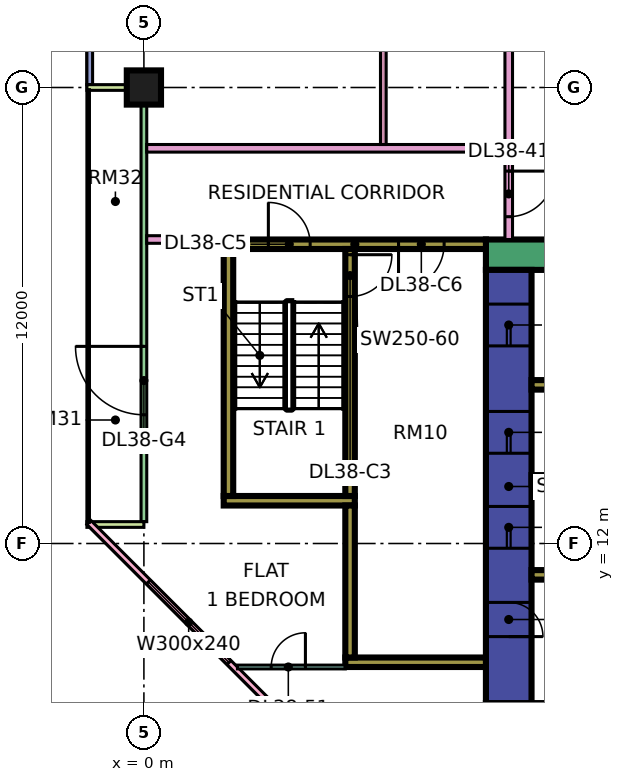
"""IFC4 building model, lengths in metres.
Left out: names, types, materials, properties, quantities, classifications, styles, units other than length and angle.
Written with IfcOpenShell. Run it as: python <this file> out.ifc"""

import sys

from ifc_helpers import new_model, si_unit, direction, frame, frame_2d, origin, origin_2d, place, context, subcontext, project, spatial, rectangle, extrude, element, fill, save


model = new_model("IFC4")
c1 = context("Model", 3, precision=1e-05, world=origin(), true_north=direction((0.0, 1.0)))
c2 = subcontext(c1, "Body", "Model", "MODEL_VIEW")
j1 = project(units=[si_unit("LENGTHUNIT", "METRE"), si_unit("PLANEANGLEUNIT", "RADIAN")], contexts=[c1])
p1 = place(None, origin())
s1 = spatial("IfcSite", under=j1, at=p1, CompositionType="ELEMENT")
p2 = place(p1, origin())
s2 = spatial("IfcBuilding", under=s1, at=p2, CompositionType="ELEMENT")
p3 = place(p2, frame((0.0, 0.0, 168.65)))
s3 = spatial("IfcBuildingStorey", under=s2, at=p3, CompositionType="ELEMENT", Elevation=168.65)
p4 = place(p3, frame((0.0, 24.0, 0.0), z_axis=(0.0, 0.0, 1.0), x_axis=(1.0, 0.0, 0.0)))
e1 = element("IfcColumn", 1, at=p4, inside=s3, PredefinedType="COLUMN", context=c2, shape_type="SweptSolid", body=[
    extrude(rectangle(XDim=0.9, YDim=0.9, at=origin_2d()), origin(), (0.0, 0.0, 1.0), 3.75),
])
p5 = place(p3, frame((9.0, 19.6, 0.0), z_axis=(0.0, 0.0, 1.0), x_axis=(1.0, 0.0, 0.0)))
e2 = element("IfcWall", 2, at=p5, inside=s3, PredefinedType="SHEAR", context=c2, shape_type="SweptSolid", body=[
    extrude(rectangle(XDim=25.0, YDim=0.8, at=frame_2d((12.5, 0.0))), origin(), (0.0, 0.0, 1.0), 3.75),
])
p6 = place(p5, frame((19.1, 0.0, 0.0)))
e3 = element("IfcOpeningElement", 3, at=p6, cuts=e2, PredefinedType="OPENING", context=c2, shape_type="SweptSolid", body=[
    extrude(rectangle(XDim=1.8, YDim=2.4, at=frame_2d((0.9, 1.2))), frame((0.0, 0.41, 0.0), z_axis=(0.0, -1.0, 0.0), x_axis=(1.0, 0.0, 0.0)), (0.0, 0.0, 1.0), 0.82),
])
p7 = place(p3, frame((9.6, 7.8, 0.0), z_axis=(0.0, 0.0, 1.0), x_axis=(0.0, 1.0, 0.0)))
e4 = element("IfcWall", 4, at=p7, inside=s3, PredefinedType="SHEAR", context=c2, shape_type="SweptSolid", body=[
    extrude(rectangle(XDim=11.4, YDim=1.2, at=frame_2d((5.7, 0.0))), origin(), (0.0, 0.0, 1.0), 3.75),
])
p8 = place(p7, frame((4.075, 0.0, 0.0)))
e5 = element("IfcOpeningElement", 5, at=p8, cuts=e4, PredefinedType="OPENING", context=c2, shape_type="SweptSolid", body=[
    extrude(rectangle(XDim=1.1, YDim=2.2, at=frame_2d((0.55, 1.1))), frame((0.0, 0.61, 0.0), z_axis=(0.0, -1.0, 0.0), x_axis=(1.0, 0.0, 0.0)), (0.0, 0.0, 1.0), 1.22),
])
p9 = place(p7, frame((6.575, 0.0, 0.0)))
e6 = element("IfcOpeningElement", 6, at=p9, cuts=e4, PredefinedType="OPENING", context=c2, shape_type="SweptSolid", body=[
    extrude(rectangle(XDim=1.1, YDim=2.2, at=frame_2d((0.55, 1.1))), frame((0.0, 0.61, 0.0), z_axis=(0.0, -1.0, 0.0), x_axis=(1.0, 0.0, 0.0)), (0.0, 0.0, 1.0), 1.22),
])
p10 = place(p7, frame((9.4, 0.0, 0.0)))
e7 = element("IfcOpeningElement", 7, at=p10, cuts=e4, PredefinedType="OPENING", context=c2, shape_type="SweptSolid", body=[
    extrude(rectangle(XDim=1.1, YDim=2.2, at=frame_2d((0.55, 1.1))), frame((0.0, 0.61, 0.0), z_axis=(0.0, -1.0, 0.0), x_axis=(1.0, 0.0, 0.0)), (0.0, 0.0, 1.0), 1.22),
])
p11 = place(p7, frame((1.75, 0.0, 0.0)))
e8 = element("IfcOpeningElement", 8, at=p11, cuts=e4, PredefinedType="OPENING", context=c2, shape_type="SweptSolid", body=[
    extrude(rectangle(XDim=0.9, YDim=2.1, at=frame_2d((0.45, 1.05))), frame((0.0, 0.61, 0.0), z_axis=(0.0, -1.0, 0.0), x_axis=(1.0, 0.0, 0.0)), (0.0, 0.0, 1.0), 1.22),
])
for number, where, z_axis, x_axis in (
    (9, (10.2, 11.175, 0.0), (0.0, 0.0, 1.0), (1.0, 0.0, 0.0)),
    (10, (10.2, 13.675, 0.0), (0.0, 0.0, 1.0), (1.0, 0.0, 0.0)),
    (11, (10.2, 16.175, 0.0), (0.0, 0.0, 1.0), (1.0, 0.0, 0.0)),
):
    element("IfcWall", number, at=place(p3, frame(where, z_axis=z_axis, x_axis=x_axis)), inside=s3, PredefinedType="SHEAR", context=c2, shape_type="SweptSolid", body=[
        extrude(rectangle(XDim=3.0, YDim=0.25, at=frame_2d((1.5, 0.0))), origin(), (0.0, 0.0, 1.0), 3.75),
    ])
p12 = place(p3, frame((2.1, 19.875, 0.0), z_axis=(0.0, 0.0, 1.0), x_axis=(1.0, 0.0, 0.0)))
e12 = element("IfcWall", 12, at=p12, inside=s3, PredefinedType="SHEAR", context=c2, shape_type="SweptSolid", body=[
    extrude(rectangle(XDim=6.9, YDim=0.25, at=frame_2d((3.45, 0.0))), origin(), (0.0, 0.0, 1.0), 3.75),
])
p13 = place(p12, frame((1.175, 0.0, 0.0)))
e13 = element("IfcOpeningElement", 13, at=p13, cuts=e12, PredefinedType="OPENING", context=c2, shape_type="SweptSolid", body=[
    extrude(rectangle(XDim=1.1, YDim=2.2, at=frame_2d((0.55, 1.1))), frame((0.0, 0.135, 0.0), z_axis=(0.0, -1.0, 0.0), x_axis=(1.0, 0.0, 0.0)), (0.0, 0.0, 1.0), 0.27),
])
p14 = place(p12, frame((4.6, 0.0, 0.0)))
e14 = element("IfcOpeningElement", 14, at=p14, cuts=e12, PredefinedType="OPENING", context=c2, shape_type="SweptSolid", body=[
    extrude(rectangle(XDim=1.2, YDim=2.2, at=frame_2d((0.6, 1.1))), frame((0.0, 0.135, 0.0), z_axis=(0.0, -1.0, 0.0), x_axis=(1.0, 0.0, 0.0)), (0.0, 0.0, 1.0), 0.27),
])
p15 = place(p3, frame((2.1, 13.125, 0.0), z_axis=(0.0, 0.0, 1.0), x_axis=(1.0, 0.0, 0.0)))
e15 = element("IfcWall", 15, at=p15, inside=s3, PredefinedType="SHEAR", context=c2, shape_type="SweptSolid", body=[
    extrude(rectangle(XDim=3.45, YDim=0.25, at=frame_2d((1.725, 0.0))), origin(), (0.0, 0.0, 1.0), 3.75),
])
p16 = place(p3, frame((2.225, 13.25, 0.0), z_axis=(0.0, 0.0, 1.0), x_axis=(0.0, 1.0, 0.0)))
e16 = element("IfcWall", 16, at=p16, inside=s3, PredefinedType="SHEAR", context=c2, shape_type="SweptSolid", body=[
    extrude(rectangle(XDim=6.5, YDim=0.25, at=frame_2d((3.25, 0.0))), origin(), (0.0, 0.0, 1.0), 3.75),
])
p17 = place(p3, frame((5.425, 13.25, 0.0), z_axis=(0.0, 0.0, 1.0), x_axis=(0.0, 1.0, 0.0)))
e17 = element("IfcWall", 17, at=p17, inside=s3, PredefinedType="SHEAR", context=c2, shape_type="SweptSolid", body=[
    extrude(rectangle(XDim=6.5, YDim=0.25, at=frame_2d((3.25, 0.0))), origin(), (0.0, 0.0, 1.0), 3.75),
])
p18 = place(p17, frame((5.25, 0.0, 0.0)))
e18 = element("IfcOpeningElement", 18, at=p18, cuts=e17, PredefinedType="OPENING", context=c2, shape_type="SweptSolid", body=[
    extrude(rectangle(XDim=1.1, YDim=2.2, at=frame_2d((0.55, 1.1))), frame((0.0, 0.135, 0.0), z_axis=(0.0, -1.0, 0.0), x_axis=(1.0, 0.0, 0.0)), (0.0, 0.0, 1.0), 0.27),
])
p19 = place(p3, frame((5.3, 8.875, 0.0), z_axis=(0.0, 0.0, 1.0), x_axis=(1.0, 0.0, 0.0)))
e19 = element("IfcWall", 19, at=p19, inside=s3, PredefinedType="SHEAR", context=c2, shape_type="SweptSolid", body=[
    extrude(rectangle(XDim=3.7, YDim=0.25, at=frame_2d((1.85, 0.0))), origin(), (0.0, 0.0, 1.0), 3.75),
])
p20 = place(p3, frame((5.425, 9.0, 0.0), z_axis=(0.0, 0.0, 1.0), x_axis=(0.0, 1.0, 0.0)))
e20 = element("IfcWall", 20, at=p20, inside=s3, PredefinedType="SHEAR", context=c2, shape_type="SweptSolid", body=[
    extrude(rectangle(XDim=4.0, YDim=0.25, at=frame_2d((2.0, 0.0))), origin(), (0.0, 0.0, 1.0), 3.75),
])
p21 = place(p3, frame((-1.425, 35.925, 0.0), z_axis=(0.0, 0.0, 1.0), x_axis=(0.0, -1.0, 0.0)))
e21 = element("IfcWall", 21, at=p21, inside=s3, PredefinedType="SOLIDWALL", context=c2, shape_type="SweptSolid", body=[
    extrude(rectangle(XDim=11.85, YDim=0.15, at=frame_2d((5.925, 0.0))), origin(), (0.0, 0.0, 1.0), 3.35),
])
p22 = place(p21, frame((0.562, 0.0, 0.45)))
e22 = element("IfcOpeningElement", 22, at=p22, cuts=e21, PredefinedType="OPENING", context=c2, shape_type="SweptSolid", body=[
    extrude(rectangle(XDim=1.8, YDim=2.4, at=frame_2d((0.9, 1.2))), frame((0.0, 0.085, 0.0), z_axis=(0.0, -1.0, 0.0), x_axis=(1.0, 0.0, 0.0)), (0.0, 0.0, 1.0), 0.17),
])
p23 = place(p21, frame((3.525, 0.0, 0.45)))
e23 = element("IfcOpeningElement", 23, at=p23, cuts=e21, PredefinedType="OPENING", context=c2, shape_type="SweptSolid", body=[
    extrude(rectangle(XDim=1.8, YDim=2.4, at=frame_2d((0.9, 1.2))), frame((0.0, 0.085, 0.0), z_axis=(0.0, -1.0, 0.0), x_axis=(1.0, 0.0, 0.0)), (0.0, 0.0, 1.0), 0.17),
])
p24 = place(p21, frame((7.387, 0.0, 0.45)))
e24 = element("IfcOpeningElement", 24, at=p24, cuts=e21, PredefinedType="OPENING", context=c2, shape_type="SweptSolid", body=[
    extrude(rectangle(XDim=3.0, YDim=2.4, at=frame_2d((1.5, 1.2))), frame((0.0, 0.085, 0.0), z_axis=(0.0, -1.0, 0.0), x_axis=(1.0, 0.0, 0.0)), (0.0, 0.0, 1.0), 0.17),
])
p25 = place(p3, frame((0.0, 23.925, 0.0), z_axis=(0.0, 0.0, 1.0), x_axis=(0.0, -1.0, 0.0)))
e25 = element("IfcWall", 25, at=p25, inside=s3, PredefinedType="SOLIDWALL", context=c2, shape_type="SweptSolid", body=[
    extrude(rectangle(XDim=11.35, YDim=0.15, at=frame_2d((5.675, 0.0))), origin(), (0.0, 0.0, 1.0), 3.35),
])
p26 = place(p25, frame((6.738, 0.0, 0.0)))
e26 = element("IfcOpeningElement", 26, at=p26, cuts=e25, PredefinedType="OPENING", context=c2, shape_type="SweptSolid", body=[
    extrude(rectangle(XDim=1.8, YDim=2.4, at=frame_2d((0.9, 1.2))), frame((0.0, 0.085, 0.0), z_axis=(0.0, -1.0, 0.0), x_axis=(1.0, 0.0, 0.0)), (0.0, 0.0, 1.0), 0.17),
])
for number, where, z_axis, x_axis in (
    (27, (-1.5, 24.0, 0.0), (0.0, 0.0, 1.0), (1.0, 0.0, 0.0)),
    (28, (-1.5, 12.5, 0.0), (0.0, 0.0, 1.0), (1.0, 0.0, 0.0)),
):
    element("IfcWall", number, at=place(p3, frame(where, z_axis=z_axis, x_axis=x_axis)), inside=s3, PredefinedType="SOLIDWALL", context=c2, shape_type="SweptSolid", body=[
        extrude(rectangle(XDim=1.5, YDim=0.15, at=frame_2d((0.75, 0.0))), origin(), (0.0, 0.0, 1.0), 3.35),
    ])
p27 = place(p3, frame((-1.447, 12.553, 0.0), z_axis=(0.0, 0.0, 1.0), x_axis=(0.707106781187, -0.707106781187, 0.0)))
e29 = element("IfcWall", 29, at=p27, inside=s3, PredefinedType="SOLIDWALL", context=c2, shape_type="SweptSolid", body=[
    extrude(rectangle(XDim=19.799, YDim=0.15, at=frame_2d((9.899, 0.0))), origin(), (0.0, 0.0, 1.0), 3.35),
])
p28 = place(p27, frame((2.212, 0.0, 0.45)))
e30 = element("IfcOpeningElement", 30, at=p28, cuts=e29, PredefinedType="OPENING", context=c2, shape_type="SweptSolid", body=[
    extrude(rectangle(XDim=3.0, YDim=2.4, at=frame_2d((1.5, 1.2))), frame((0.0, 0.085, 0.0), z_axis=(0.0, -1.0, 0.0), x_axis=(1.0, 0.0, 0.0)), (0.0, 0.0, 1.0), 0.17),
])
p29 = place(p27, frame((10.216, 0.0, 0.45)))
e31 = element("IfcOpeningElement", 31, at=p29, cuts=e29, PredefinedType="OPENING", context=c2, shape_type="SweptSolid", body=[
    extrude(rectangle(XDim=3.0, YDim=2.4, at=frame_2d((1.5, 1.2))), frame((0.0, 0.085, 0.0), z_axis=(0.0, -1.0, 0.0), x_axis=(1.0, 0.0, 0.0)), (0.0, 0.0, 1.0), 0.17),
])
p30 = place(p3, frame((0.074, 20.0, 0.0), z_axis=(0.0, 0.0, 1.0), x_axis=(1.0, 0.0, 0.0)))
e32 = element("IfcWall", 32, at=p30, inside=s3, PredefinedType="PARTITIONING", context=c2, shape_type="SweptSolid", body=[
    extrude(rectangle(XDim=2.026, YDim=0.2, at=frame_2d((1.013, 0.0))), origin(), (0.0, 0.0, 1.0), 3.35),
])
p31 = place(p3, frame((0.074, 22.4, 0.0), z_axis=(0.0, 0.0, 1.0), x_axis=(1.0, 0.0, 0.0)))
e33 = element("IfcWall", 33, at=p31, inside=s3, PredefinedType="PARTITIONING", context=c2, shape_type="SweptSolid", body=[
    extrude(rectangle(XDim=9.426, YDim=0.2, at=frame_2d((4.713, 0.0))), origin(), (0.0, 0.0, 1.0), 3.35),
])
p32 = place(p3, frame((2.461, 8.75, 0.0), z_axis=(0.0, 0.0, 1.0), x_axis=(1.0, 0.0, 0.0)))
e34 = element("IfcWall", 34, at=p32, inside=s3, PredefinedType="PARTITIONING", context=c2, shape_type="SweptSolid", body=[
    extrude(rectangle(XDim=2.839, YDim=0.1, at=frame_2d((1.419, 0.0))), origin(), (0.0, 0.0, 1.0), 3.35),
])
p33 = place(p32, frame((0.889, 0.0, 0.0)))
e35 = element("IfcOpeningElement", 35, at=p33, cuts=e34, PredefinedType="OPENING", context=c2, shape_type="SweptSolid", body=[
    extrude(rectangle(XDim=0.9, YDim=2.1, at=frame_2d((0.45, 1.05))), frame((0.0, 0.06, 0.0), z_axis=(0.0, -1.0, 0.0), x_axis=(1.0, 0.0, 0.0)), (0.0, 0.0, 1.0), 0.12),
])
p34 = place(p3, frame((6.3, 22.5, 0.0), z_axis=(0.0, 0.0, 1.0), x_axis=(0.0, 1.0, 0.0)))
e36 = element("IfcWall", 36, at=p34, inside=s3, PredefinedType="PARTITIONING", context=c2, shape_type="SweptSolid", body=[
    extrude(rectangle(XDim=11.175, YDim=0.15, at=frame_2d((5.587, 0.0))), origin(), (0.0, 0.0, 1.0), 3.35),
])
p35 = place(p34, frame((9.15, 0.0, 0.0)))
e37 = element("IfcOpeningElement", 37, at=p35, cuts=e36, PredefinedType="OPENING", context=c2, shape_type="SweptSolid", body=[
    extrude(rectangle(XDim=0.8, YDim=2.1, at=frame_2d((0.4, 1.05))), frame((0.0, 0.085, 0.0), z_axis=(0.0, -1.0, 0.0), x_axis=(1.0, 0.0, 0.0)), (0.0, 0.0, 1.0), 0.17),
])
p36 = place(p34, frame((3.5, 0.0, 0.0)))
e38 = element("IfcOpeningElement", 38, at=p36, cuts=e36, PredefinedType="OPENING", context=c2, shape_type="SweptSolid", body=[
    extrude(rectangle(XDim=0.9, YDim=2.1, at=frame_2d((0.45, 1.05))), frame((0.0, 0.085, 0.0), z_axis=(0.0, -1.0, 0.0), x_axis=(1.0, 0.0, 0.0)), (0.0, 0.0, 1.0), 0.17),
])
p37 = place(p3, frame((9.6, 20.0, 0.0), z_axis=(0.0, 0.0, 1.0), x_axis=(0.0, 1.0, 0.0)))
e39 = element("IfcWall", 39, at=p37, inside=s3, PredefinedType="PARTITIONING", context=c2, shape_type="SweptSolid", body=[
    extrude(rectangle(XDim=44.35, YDim=0.2, at=frame_2d((22.175, 0.0))), origin(), (0.0, 0.0, 1.0), 3.35),
])
p38 = place(p37, frame((28.8, 0.0, 0.0)))
e40 = element("IfcOpeningElement", 40, at=p38, cuts=e39, PredefinedType="OPENING", context=c2, shape_type="SweptSolid", body=[
    extrude(rectangle(XDim=1.0, YDim=2.1, at=frame_2d((0.5, 1.05))), frame((0.0, 0.11, 0.0), z_axis=(0.0, -1.0, 0.0), x_axis=(1.0, 0.0, 0.0)), (0.0, 0.0, 1.0), 0.22),
])
p39 = place(p37, frame((32.1, 0.0, 0.0)))
e41 = element("IfcOpeningElement", 41, at=p39, cuts=e39, PredefinedType="OPENING", context=c2, shape_type="SweptSolid", body=[
    extrude(rectangle(XDim=1.0, YDim=2.1, at=frame_2d((0.5, 1.05))), frame((0.0, 0.11, 0.0), z_axis=(0.0, -1.0, 0.0), x_axis=(1.0, 0.0, 0.0)), (0.0, 0.0, 1.0), 0.22),
])
p40 = place(p37, frame((0.6, 0.0, 0.0)))
e42 = element("IfcOpeningElement", 42, at=p40, cuts=e39, PredefinedType="OPENING", context=c2, shape_type="SweptSolid", body=[
    extrude(rectangle(XDim=1.2, YDim=2.1, at=frame_2d((0.6, 1.05))), frame((0.0, 0.11, 0.0), z_axis=(0.0, -1.0, 0.0), x_axis=(1.0, 0.0, 0.0)), (0.0, 0.0, 1.0), 0.22),
])
p41 = place(p37, frame((14.25, 0.0, 0.0)))
e43 = element("IfcOpeningElement", 43, at=p41, cuts=e39, PredefinedType="OPENING", context=c2, shape_type="SweptSolid", body=[
    extrude(rectangle(XDim=1.0, YDim=2.1, at=frame_2d((0.5, 1.05))), frame((0.0, 0.11, 0.0), z_axis=(0.0, -1.0, 0.0), x_axis=(1.0, 0.0, 0.0)), (0.0, 0.0, 1.0), 0.22),
])
p42 = place(p26, frame((1.8, 0.0, 0.0), z_axis=(0.0, 0.0, 1.0), x_axis=(-1.0, 0.0, 0.0)))
e44 = element("IfcDoor", 44, at=p42, inside=s3, OperationType="DOUBLE_DOOR_SINGLE_SWING", PredefinedType="DOOR", context=c2, shape_type="SweptSolid", body=[
    extrude(rectangle(XDim=1.8, YDim=2.4, at=frame_2d((0.9, 1.2))), frame((0.0, 0.025, 0.0), z_axis=(0.0, -1.0, 0.0), x_axis=(1.0, 0.0, 0.0)), (0.0, 0.0, 1.0), 0.05),
])
fill(e26, e44)
p43 = place(p28, origin())
e45 = element("IfcWindow", 45, at=p43, inside=s3, PartitioningType="SINGLE_PANEL", PredefinedType="WINDOW", context=c2, shape_type="SweptSolid", body=[
    extrude(rectangle(XDim=3.0, YDim=2.4, at=frame_2d((1.5, 1.2))), frame((0.0, 0.03, 0.0), z_axis=(0.0, -1.0, 0.0), x_axis=(1.0, 0.0, 0.0)), (0.0, 0.0, 1.0), 0.06),
])
fill(e30, e45)
p44 = place(p8, origin())
e46 = element("IfcDoor", 46, at=p44, inside=s3, OperationType="DOUBLE_DOOR_SLIDING", PredefinedType="DOOR", context=c2, shape_type="SweptSolid", body=[
    extrude(rectangle(XDim=1.1, YDim=2.2, at=frame_2d((0.55, 1.1))), frame((0.0, 0.025, 0.0), z_axis=(0.0, -1.0, 0.0), x_axis=(1.0, 0.0, 0.0)), (0.0, 0.0, 1.0), 0.05),
])
fill(e5, e46)
p45 = place(p9, origin())
e47 = element("IfcDoor", 47, at=p45, inside=s3, OperationType="DOUBLE_DOOR_SLIDING", PredefinedType="DOOR", context=c2, shape_type="SweptSolid", body=[
    extrude(rectangle(XDim=1.1, YDim=2.2, at=frame_2d((0.55, 1.1))), frame((0.0, 0.025, 0.0), z_axis=(0.0, -1.0, 0.0), x_axis=(1.0, 0.0, 0.0)), (0.0, 0.0, 1.0), 0.05),
])
fill(e6, e47)
p46 = place(p10, origin())
e48 = element("IfcDoor", 48, at=p46, inside=s3, OperationType="DOUBLE_DOOR_SLIDING", PredefinedType="DOOR", context=c2, shape_type="SweptSolid", body=[
    extrude(rectangle(XDim=1.1, YDim=2.2, at=frame_2d((0.55, 1.1))), frame((0.0, 0.025, 0.0), z_axis=(0.0, -1.0, 0.0), x_axis=(1.0, 0.0, 0.0)), (0.0, 0.0, 1.0), 0.05),
])
fill(e7, e48)
p47 = place(p18, origin())
e49 = element("IfcDoor", 49, at=p47, inside=s3, OperationType="SINGLE_SWING_RIGHT", PredefinedType="DOOR", context=c2, shape_type="SweptSolid", body=[
    extrude(rectangle(XDim=1.1, YDim=2.2, at=frame_2d((0.55, 1.1))), frame((0.0, 0.025, 0.0), z_axis=(0.0, -1.0, 0.0), x_axis=(1.0, 0.0, 0.0)), (0.0, 0.0, 1.0), 0.05),
])
fill(e18, e49)
p48 = place(p11, frame((0.9, 0.0, 0.0), z_axis=(0.0, 0.0, 1.0), x_axis=(-1.0, 0.0, 0.0)))
e50 = element("IfcDoor", 50, at=p48, inside=s3, OperationType="SINGLE_SWING_LEFT", PredefinedType="DOOR", context=c2, shape_type="SweptSolid", body=[
    extrude(rectangle(XDim=0.9, YDim=2.1, at=frame_2d((0.45, 1.05))), frame((0.0, 0.025, 0.0), z_axis=(0.0, -1.0, 0.0), x_axis=(1.0, 0.0, 0.0)), (0.0, 0.0, 1.0), 0.05),
])
fill(e8, e50)
p49 = place(p13, origin())
e51 = element("IfcDoor", 51, at=p49, inside=s3, OperationType="SINGLE_SWING_LEFT", PredefinedType="DOOR", context=c2, shape_type="SweptSolid", body=[
    extrude(rectangle(XDim=1.1, YDim=2.2, at=frame_2d((0.55, 1.1))), frame((0.0, 0.025, 0.0), z_axis=(0.0, -1.0, 0.0), x_axis=(1.0, 0.0, 0.0)), (0.0, 0.0, 1.0), 0.05),
])
fill(e13, e51)
p50 = place(p14, frame((1.2, 0.0, 0.0), z_axis=(0.0, 0.0, 1.0), x_axis=(-1.0, 0.0, 0.0)))
e52 = element("IfcDoor", 52, at=p50, inside=s3, OperationType="SINGLE_SWING_LEFT", PredefinedType="DOOR", context=c2, shape_type="SweptSolid", body=[
    extrude(rectangle(XDim=1.2, YDim=2.2, at=frame_2d((0.6, 1.1))), frame((0.0, 0.025, 0.0), z_axis=(0.0, -1.0, 0.0), x_axis=(1.0, 0.0, 0.0)), (0.0, 0.0, 1.0), 0.05),
])
fill(e14, e52)
p51 = place(p40, origin())
e53 = element("IfcDoor", 53, at=p51, inside=s3, OperationType="SINGLE_SWING_RIGHT", PredefinedType="DOOR", context=c2, shape_type="SweptSolid", body=[
    extrude(rectangle(XDim=1.2, YDim=2.1, at=frame_2d((0.6, 1.05))), frame((0.0, 0.025, 0.0), z_axis=(0.0, -1.0, 0.0), x_axis=(1.0, 0.0, 0.0)), (0.0, 0.0, 1.0), 0.05),
])
fill(e42, e53)
p52 = place(p33, frame((0.9, 0.0, 0.0), z_axis=(0.0, 0.0, 1.0), x_axis=(-1.0, 0.0, 0.0)))
e54 = element("IfcDoor", 54, at=p52, inside=s3, OperationType="SINGLE_SWING_RIGHT", PredefinedType="DOOR", context=c2, shape_type="SweptSolid", body=[
    extrude(rectangle(XDim=0.9, YDim=2.1, at=frame_2d((0.45, 1.05))), frame((0.0, 0.025, 0.0), z_axis=(0.0, -1.0, 0.0), x_axis=(1.0, 0.0, 0.0)), (0.0, 0.0, 1.0), 0.05),
])
fill(e35, e54)
save(model, sys.argv[1])
